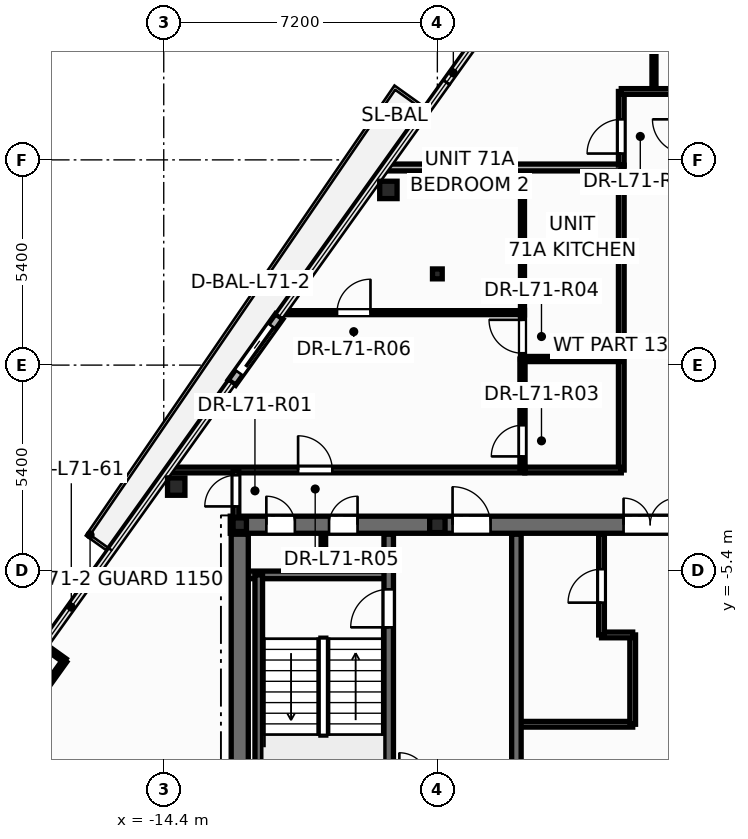
"""IFC4 building model, lengths in metres.
Left out: names, types, materials, properties, quantities, classifications, styles, units other than length and angle.
Written with IfcOpenShell. Run it as: python <this file> out.ifc"""

import sys

from ifc_helpers import new_model, si_unit, direction, frame, frame_2d, origin, origin_2d, place, context, subcontext, project, spatial, rectangle, hollow_circle, i_section, extrude, element, fill, save


model = new_model("IFC4")
c1 = context("Model", 3, precision=1e-05, world=origin(), true_north=direction((0.0, 1.0)))
c2 = subcontext(c1, "Body", "Model", "MODEL_VIEW")
j1 = project(units=[si_unit("LENGTHUNIT", "METRE"), si_unit("PLANEANGLEUNIT", "RADIAN")], contexts=[c1])
p1 = place(None, origin())
s1 = spatial("IfcSite", under=j1, at=p1, CompositionType="ELEMENT")
p2 = place(p1, origin())
s2 = spatial("IfcBuilding", under=s1, at=p2, CompositionType="ELEMENT")
p3 = place(p2, frame((0.0, 0.0, 270.6)))
s3 = spatial("IfcBuildingStorey", under=s2, at=p3, CompositionType="ELEMENT", Elevation=270.6)
for number, where, z_axis, x_axis in (
    (1, (-8.489, 4.61, 0.0), (0.0, 0.0, 1.0), (1.0, 0.0, 0.0)),
    (2, (-14.072, -3.196, 0.0), (0.0, 0.0, 1.0), (1.0, 0.0, 0.0)),
):
    element("IfcColumn", number, at=place(p3, frame(where, z_axis=z_axis, x_axis=x_axis)), inside=s3, PredefinedType="COLUMN", context=c2, shape_type="SweptSolid", body=[
        extrude(hollow_circle(Radius=0.229, WallThickness=0.016, at=origin_2d()), origin(), (0.0, 0.0, 1.0), 3.6),
    ])
p4 = place(p3, frame((-12.4, -4.2, 0.0), z_axis=(0.0, 0.0, 1.0), x_axis=(1.0, 0.0, 0.0)))
e3 = element("IfcColumn", 3, at=p4, inside=s3, PredefinedType="COLUMN", context=c2, shape_type="SweptSolid", body=[
    extrude(i_section(OverallWidth=0.352, OverallDepth=0.359, WebThickness=0.018, FlangeThickness=0.026, at=origin_2d()), origin(), (0.0, 0.0, 1.0), 3.6),
])
p5 = place(p3, frame((-7.2, -4.2, 0.0), z_axis=(0.0, 0.0, 1.0), x_axis=(1.0, 0.0, 0.0)))
e4 = element("IfcColumn", 4, at=p5, inside=s3, PredefinedType="PILASTER", context=c2, shape_type="SweptSolid", body=[
    extrude(i_section(OverallWidth=0.405, OverallDepth=0.414, WebThickness=0.022, FlangeThickness=0.032, at=origin_2d()), origin(), (0.0, 0.0, 1.0), 3.6),
])
p6 = place(p3, frame((-7.2, 2.4, 0.0), z_axis=(0.0, 0.0, 1.0), x_axis=(1.0, 0.0, 0.0)))
e5 = element("IfcColumn", 5, at=p6, inside=s3, PredefinedType="COLUMN", context=c2, shape_type="SweptSolid", body=[
    extrude(i_section(OverallWidth=0.256, OverallDepth=0.26, WebThickness=0.01, FlangeThickness=0.017, at=origin_2d()), origin(), (0.0, 0.0, 1.0), 3.6),
])
p7 = place(p3, frame((-11.361, 1.281, -0.015), z_axis=(0.0, 0.0, 1.0), x_axis=(-0.581702133873, -0.813401885569, 0.0)))
e6 = element("IfcWall", 6, at=p7, inside=s3, PredefinedType="STANDARD", context=c2, shape_type="SweptSolid", body=[
    extrude(rectangle(XDim=2.14, YDim=0.24, at=frame_2d((1.07, 0.0))), origin(), (0.0, 0.0, 1.0), 2.878),
])
p8 = place(p7, frame((0.32, 0.0, 0.015)))
e7 = element("IfcOpeningElement", 7, at=p8, cuts=e6, PredefinedType="OPENING", context=c2, shape_type="SweptSolid", body=[
    extrude(rectangle(XDim=1.506, YDim=2.204, at=frame_2d((0.75, 1.102))), frame((0.0, 0.13, 0.0), z_axis=(0.0, -1.0, 0.0), x_axis=(1.0, 0.0, 0.0)), (0.0, 0.0, 1.0), 0.26),
])
p9 = place(p3, frame((-5.12, -9.45, 0.0), z_axis=(0.0, 0.0, 1.0), x_axis=(1.0, 0.0, 0.0)))
e8 = element("IfcWall", 8, at=p9, inside=s3, PredefinedType="PARTITIONING", context=c2, shape_type="SweptSolid", body=[
    extrude(rectangle(XDim=3.06, YDim=0.15, at=frame_2d((1.53, 0.0))), origin(), (0.0, 0.0, 1.0), 3.345),
])
p10 = place(p3, frame((-2.06, -9.45, 0.0), z_axis=(0.0, 0.0, 1.0), x_axis=(0.0, 1.0, 0.0)))
e9 = element("IfcWall", 9, at=p10, inside=s3, PredefinedType="PARTITIONING", context=c2, shape_type="SweptSolid", body=[
    extrude(rectangle(XDim=2.35, YDim=0.15, at=frame_2d((1.175, 0.0))), origin(), (0.0, 0.0, 1.0), 3.345),
])
p11 = place(p3, frame((-2.88, -7.1, 0.0), z_axis=(0.0, 0.0, 1.0), x_axis=(1.0, 0.0, 0.0)))
e10 = element("IfcWall", 10, at=p11, inside=s3, PredefinedType="PARTITIONING", context=c2, shape_type="SweptSolid", body=[
    extrude(rectangle(XDim=0.82, YDim=0.15, at=frame_2d((0.41, 0.0))), origin(), (0.0, 0.0, 1.0), 3.345),
])
p12 = place(p3, frame((-2.88, -7.1, 0.0), z_axis=(0.0, 0.0, 1.0), x_axis=(0.0, 1.0, 0.0)))
e11 = element("IfcWall", 11, at=p12, inside=s3, PredefinedType="PARTITIONING", context=c2, shape_type="SweptSolid", body=[
    extrude(rectangle(XDim=2.65, YDim=0.15, at=frame_2d((1.325, 0.0))), origin(), (0.0, 0.0, 1.0), 3.345),
])
p13 = place(p12, frame((0.85, 0.0, 0.0)))
e12 = element("IfcOpeningElement", 12, at=p13, cuts=e11, PredefinedType="OPENING", context=c2, shape_type="SweptSolid", body=[
    extrude(rectangle(XDim=0.886, YDim=2.104, at=frame_2d((0.44, 1.052))), frame((0.0, 0.085, 0.0), z_axis=(0.0, -1.0, 0.0), x_axis=(1.0, 0.0, 0.0)), (0.0, 0.0, 1.0), 0.17),
])
p14 = place(p3, frame((-10.2, -5.52, 0.0), z_axis=(0.0, 0.0, 1.0), x_axis=(0.0, 1.0, 0.0)))
e13 = element("IfcWall", 13, at=p14, inside=s3, PredefinedType="PARTITIONING", context=c2, shape_type="SweptSolid", body=[
    extrude(rectangle(XDim=1.12, YDim=0.12, at=frame_2d((0.56, 0.0))), origin(), (0.0, 0.0, 1.0), 3.345),
])
p15 = place(p3, frame((-12.65, -4.2, 0.0), z_axis=(0.0, 0.0, 1.0), x_axis=(1.0, 0.0, 0.0)))
e14 = element("IfcWall", 14, at=p15, inside=s3, PredefinedType="SHEAR", context=c2, shape_type="SweptSolid", body=[
    extrude(rectangle(XDim=25.3, YDim=0.45, at=frame_2d((12.65, 0.0))), origin(), (0.0, 0.0, 1.0), 3.6),
])
p16 = place(p15, frame((0.95, 0.0, 0.0)))
e15 = element("IfcOpeningElement", 15, at=p16, cuts=e14, PredefinedType="OPENING", context=c2, shape_type="SweptSolid", body=[
    extrude(rectangle(XDim=0.756, YDim=2.054, at=frame_2d((0.375, 1.027))), frame((0.0, 0.235, 0.0), z_axis=(0.0, -1.0, 0.0), x_axis=(1.0, 0.0, 0.0)), (0.0, 0.0, 1.0), 0.47),
])
p17 = place(p15, frame((2.6, 0.0, 0.0)))
e16 = element("IfcOpeningElement", 16, at=p17, cuts=e14, PredefinedType="OPENING", context=c2, shape_type="SweptSolid", body=[
    extrude(rectangle(XDim=0.756, YDim=2.054, at=frame_2d((0.375, 1.027))), frame((0.0, 0.235, 0.0), z_axis=(0.0, -1.0, 0.0), x_axis=(1.0, 0.0, 0.0)), (0.0, 0.0, 1.0), 0.47),
])
p18 = place(p15, frame((21.85, 0.0, 0.0)))
e17 = element("IfcOpeningElement", 17, at=p18, cuts=e14, PredefinedType="OPENING", context=c2, shape_type="SweptSolid", body=[
    extrude(rectangle(XDim=0.756, YDim=2.054, at=frame_2d((0.375, 1.027))), frame((0.0, 0.235, 0.0), z_axis=(0.0, -1.0, 0.0), x_axis=(1.0, 0.0, 0.0)), (0.0, 0.0, 1.0), 0.47),
])
p19 = place(p15, frame((23.5, 0.0, 0.0)))
e18 = element("IfcOpeningElement", 18, at=p19, cuts=e14, PredefinedType="OPENING", context=c2, shape_type="SweptSolid", body=[
    extrude(rectangle(XDim=0.756, YDim=2.054, at=frame_2d((0.375, 1.027))), frame((0.0, 0.235, 0.0), z_axis=(0.0, -1.0, 0.0), x_axis=(1.0, 0.0, 0.0)), (0.0, 0.0, 1.0), 0.47),
])
p20 = place(p15, frame((5.85, 0.0, 0.0)))
e19 = element("IfcOpeningElement", 19, at=p20, cuts=e14, PredefinedType="OPENING", context=c2, shape_type="SweptSolid", body=[
    extrude(rectangle(XDim=1.006, YDim=2.104, at=frame_2d((0.5, 1.052))), frame((0.0, 0.235, 0.0), z_axis=(0.0, -1.0, 0.0), x_axis=(1.0, 0.0, 0.0)), (0.0, 0.0, 1.0), 0.47),
])
p21 = place(p15, frame((10.35, 0.0, 0.0)))
e20 = element("IfcOpeningElement", 20, at=p21, cuts=e14, PredefinedType="OPENING", context=c2, shape_type="SweptSolid", body=[
    extrude(rectangle(XDim=1.406, YDim=2.154, at=frame_2d((0.7, 1.077))), frame((0.0, 0.235, 0.0), z_axis=(0.0, -1.0, 0.0), x_axis=(1.0, 0.0, 0.0)), (0.0, 0.0, 1.0), 0.47),
])
p22 = place(p15, frame((18.45, 0.0, 0.0)))
e21 = element("IfcOpeningElement", 21, at=p22, cuts=e14, PredefinedType="OPENING", context=c2, shape_type="SweptSolid", body=[
    extrude(rectangle(XDim=1.006, YDim=2.104, at=frame_2d((0.5, 1.052))), frame((0.0, 0.235, 0.0), z_axis=(0.0, -1.0, 0.0), x_axis=(1.0, 0.0, 0.0)), (0.0, 0.0, 1.0), 0.47),
])
p23 = place(p3, frame((-12.35, -5.52, 0.0), z_axis=(0.0, 0.0, 1.0), x_axis=(1.0, 0.0, 0.0)))
e22 = element("IfcWall", 22, at=p23, inside=s3, PredefinedType="SOLIDWALL", context=c2, shape_type="SweptSolid", body=[
    extrude(rectangle(XDim=3.87, YDim=0.2, at=frame_2d((1.935, 0.0))), origin(), (0.0, 0.0, 1.0), 3.6),
])
p24 = place(p3, frame((-11.9, -13.1, 0.0), z_axis=(0.0, 0.0, 1.0), x_axis=(0.0, 1.0, 0.0)))
e23 = element("IfcWall", 23, at=p24, inside=s3, PredefinedType="SOLIDWALL", context=c2, shape_type="SweptSolid", body=[
    extrude(rectangle(XDim=7.58, YDim=0.2, at=frame_2d((3.79, 0.0))), origin(), (0.0, 0.0, 1.0), 3.6),
])
p25 = place(p3, frame((-8.48, -13.85, 0.0), z_axis=(0.0, 0.0, 1.0), x_axis=(0.0, 1.0, 0.0)))
e24 = element("IfcWall", 24, at=p25, inside=s3, PredefinedType="SHEAR", context=c2, shape_type="SweptSolid", body=[
    extrude(rectangle(XDim=9.4, YDim=0.25, at=frame_2d((4.7, 0.0))), origin(), (0.0, 0.0, 1.0), 3.6),
])
p26 = place(p25, frame((6.95, 0.0, 0.0)))
e25 = element("IfcOpeningElement", 25, at=p26, cuts=e24, PredefinedType="OPENING", context=c2, shape_type="SweptSolid", body=[
    extrude(rectangle(XDim=1.006, YDim=2.104, at=frame_2d((0.5, 1.052))), frame((0.0, 0.135, 0.0), z_axis=(0.0, -1.0, 0.0), x_axis=(1.0, 0.0, 0.0)), (0.0, 0.0, 1.0), 0.27),
])
p27 = place(p3, frame((-5.12, -13.85, 0.0), z_axis=(0.0, 0.0, 1.0), x_axis=(0.0, 1.0, 0.0)))
e26 = element("IfcWall", 26, at=p27, inside=s3, PredefinedType="SHEAR", context=c2, shape_type="SweptSolid", body=[
    extrude(rectangle(XDim=9.4, YDim=0.25, at=frame_2d((4.7, 0.0))), origin(), (0.0, 0.0, 1.0), 3.6),
])
p28 = place(p3, frame((-12.4, -13.85, 0.0), z_axis=(0.0, 0.0, 1.0), x_axis=(0.0, 1.0, 0.0)))
e27 = element("IfcWall", 27, at=p28, inside=s3, PredefinedType="SHEAR", context=c2, shape_type="SweptSolid", body=[
    extrude(rectangle(XDim=9.4, YDim=0.45, at=frame_2d((4.7, 0.0))), origin(), (0.0, 0.0, 1.0), 3.6),
])
p29 = place(p3, frame((-14.251, -2.76, 0.0), z_axis=(0.0, 0.0, 1.0), x_axis=(1.0, 0.0, 0.0)))
e28 = element("IfcWall", 28, at=p29, inside=s3, PredefinedType="PARTITIONING", context=c2, shape_type="SweptSolid", body=[
    extrude(rectangle(XDim=9.351, YDim=0.15, at=frame_2d((4.676, 0.0))), origin(), (0.0, 0.0, 1.0), 2.32),
])
p30 = place(p29, frame((3.386, 0.0, 0.0)))
e29 = element("IfcOpeningElement", 29, at=p30, cuts=e28, PredefinedType="OPENING", context=c2, shape_type="SweptSolid", body=[
    extrude(rectangle(XDim=0.906, YDim=2.104, at=frame_2d((0.45, 1.052))), frame((0.0, 0.085, 0.0), z_axis=(0.0, -1.0, 0.0), x_axis=(1.0, 0.0, 0.0)), (0.0, 0.0, 1.0), 0.17),
])
p31 = place(p3, frame((-1.5, 7.2, 0.0), z_axis=(0.0, 0.0, 1.0), x_axis=(0.0, 1.0, 0.0)))
e30 = element("IfcWall", 30, at=p31, inside=s3, PredefinedType="PARTITIONING", context=c2, shape_type="SweptSolid", body=[
    extrude(rectangle(XDim=6.917, YDim=0.105, at=frame_2d((3.458, 0.0))), origin(), (0.0, 0.0, 1.0), 2.718),
])
p32 = place(p3, frame((-11.29, 1.38, 0.0), z_axis=(0.0, 0.0, 1.0), x_axis=(1.0, 0.0, 0.0)))
e31 = element("IfcWall", 31, at=p32, inside=s3, PredefinedType="PARTITIONING", context=c2, shape_type="SweptSolid", body=[
    extrude(rectangle(XDim=6.33, YDim=0.105, at=frame_2d((3.165, 0.0))), origin(), (0.0, 0.0, 1.0), 2.32),
])
p33 = place(p32, frame((1.45, 0.0, 0.0)))
e32 = element("IfcOpeningElement", 32, at=p33, cuts=e31, PredefinedType="OPENING", context=c2, shape_type="SweptSolid", body=[
    extrude(rectangle(XDim=0.886, YDim=2.104, at=frame_2d((0.44, 1.052))), frame((0.0, 0.062, 0.0), z_axis=(0.0, -1.0, 0.0), x_axis=(1.0, 0.0, 0.0)), (0.0, 0.0, 1.0), 0.125),
])
p34 = place(p3, frame((-2.36, -2.76, 0.0), z_axis=(0.0, 0.0, 1.0), x_axis=(0.0, 1.0, 0.0)))
e33 = element("IfcWall", 33, at=p34, inside=s3, PredefinedType="PARTITIONING", context=c2, shape_type="SweptSolid", body=[
    extrude(rectangle(XDim=8.02, YDim=0.15, at=frame_2d((4.01, 0.0))), origin(), (0.0, 0.0, 1.0), 2.32),
])
p35 = place(p3, frame((-4.96, 1.32, 0.0), z_axis=(0.0, 0.0, 1.0), x_axis=(0.0, 1.0, 0.0)))
e34 = element("IfcWall", 34, at=p35, inside=s3, PredefinedType="PARTITIONING", context=c2, shape_type="SweptSolid", body=[
    extrude(rectangle(XDim=3.88, YDim=0.105, at=frame_2d((1.94, 0.0))), origin(), (0.0, 0.0, 1.0), 2.32),
])
p36 = place(p3, frame((-8.558, 5.2, 0.0), z_axis=(0.0, 0.0, 1.0), x_axis=(1.0, 0.0, 0.0)))
e35 = element("IfcWall", 35, at=p36, inside=s3, PredefinedType="PARTITIONING", context=c2, shape_type="SweptSolid", body=[
    extrude(rectangle(XDim=6.198, YDim=0.18, at=frame_2d((3.099, 0.0))), origin(), (0.0, 0.0, 1.0), 2.718),
])
p37 = place(p3, frame((-4.96, -2.76, 0.0), z_axis=(0.0, 0.0, 1.0), x_axis=(0.0, 1.0, 0.0)))
e36 = element("IfcWall", 36, at=p37, inside=s3, PredefinedType="PARTITIONING", context=c2, shape_type="SweptSolid", body=[
    extrude(rectangle(XDim=2.92, YDim=0.135, at=frame_2d((1.46, 0.0))), origin(), (0.0, 0.0, 1.0), 3.345),
])
p38 = place(p37, frame((0.357, 0.0, 0.0)))
e37 = element("IfcOpeningElement", 37, at=p38, cuts=e36, PredefinedType="OPENING", context=c2, shape_type="SweptSolid", body=[
    extrude(rectangle(XDim=0.826, YDim=2.104, at=frame_2d((0.41, 1.052))), frame((0.0, 0.078, 0.0), z_axis=(0.0, -1.0, 0.0), x_axis=(1.0, 0.0, 0.0)), (0.0, 0.0, 1.0), 0.155),
])
p39 = place(p3, frame((-4.898, -2.76, 0.0), z_axis=(0.0, 0.0, 1.0), x_axis=(1.0, 0.0, 0.0)))
e38 = element("IfcWall", 38, at=p39, inside=s3, PredefinedType="PARTITIONING", context=c2, shape_type="SweptSolid", body=[
    extrude(rectangle(XDim=2.538, YDim=0.15, at=frame_2d((1.269, 0.0))), origin(), (0.0, 0.0, 1.0), 2.964),
])
p40 = place(p3, frame((-4.96, 0.16, 0.0), z_axis=(0.0, 0.0, 1.0), x_axis=(1.0, 0.0, 0.0)))
e39 = element("IfcWall", 39, at=p40, inside=s3, PredefinedType="PARTITIONING", context=c2, shape_type="SweptSolid", body=[
    extrude(rectangle(XDim=2.6, YDim=0.135, at=frame_2d((1.3, 0.0))), origin(), (0.0, 0.0, 1.0), 2.964),
])
p41 = place(p3, frame((-17.003, -7.776, 0.0), z_axis=(0.0, 0.0, 1.0), x_axis=(-0.581731659236, -0.813380769777, 0.0)))
e40 = element("IfcWall", 40, at=p41, inside=s3, PredefinedType="PARTITIONING", context=c2, shape_type="SweptSolid", body=[
    extrude(rectangle(XDim=2.48, YDim=0.12, at=frame_2d((1.24, 0.0))), origin(), (0.0, 0.0, 1.0), 2.32),
])
p42 = place(p3, frame((-2.36, 5.262, 0.0), z_axis=(0.0, 0.0, 1.0), x_axis=(0.0, 1.0, 0.0)))
e41 = element("IfcWall", 41, at=p42, inside=s3, PredefinedType="PARTITIONING", context=c2, shape_type="SweptSolid", body=[
    extrude(rectangle(XDim=1.938, YDim=0.15, at=frame_2d((0.969, 0.0))), origin(), (0.0, 0.0, 1.0), 2.964),
])
p43 = place(p42, frame((0.305, 0.0, 0.0)))
e42 = element("IfcOpeningElement", 42, at=p43, cuts=e41, PredefinedType="OPENING", context=c2, shape_type="SweptSolid", body=[
    extrude(rectangle(XDim=0.906, YDim=2.104, at=frame_2d((0.45, 1.052))), frame((0.0, 0.085, 0.0), z_axis=(0.0, -1.0, 0.0), x_axis=(1.0, 0.0, 0.0)), (0.0, 0.0, 1.0), 0.17),
])
p44 = place(p3, frame((-12.5, -4.24, 0.0), z_axis=(0.0, 0.0, 1.0), x_axis=(0.0, 1.0, 0.0)))
e43 = element("IfcWall", 43, at=p44, inside=s3, PredefinedType="PARTITIONING", context=c2, shape_type="SweptSolid", body=[
    extrude(rectangle(XDim=1.48, YDim=0.15, at=frame_2d((0.74, 0.0))), origin(), (0.0, 0.0, 1.0), 2.32),
])
p45 = place(p44, frame((0.522, 0.0, 0.0)))
e44 = element("IfcOpeningElement", 44, at=p45, cuts=e43, PredefinedType="OPENING", context=c2, shape_type="SweptSolid", body=[
    extrude(rectangle(XDim=0.826, YDim=2.104, at=frame_2d((0.41, 1.052))), frame((0.0, 0.085, 0.0), z_axis=(0.0, -1.0, 0.0), x_axis=(1.0, 0.0, 0.0)), (0.0, 0.0, 1.0), 0.17),
])
p46 = place(p3, frame((-4.96, 0.16, 0.0), z_axis=(0.0, 0.0, 1.0), x_axis=(0.0, 1.0, 0.0)))
e45 = element("IfcWall", 45, at=p46, inside=s3, PredefinedType="PARTITIONING", context=c2, shape_type="SweptSolid", body=[
    extrude(rectangle(XDim=1.28, YDim=0.105, at=frame_2d((0.64, 0.0))), origin(), (0.0, 0.0, 1.0), 3.345),
])
p47 = place(p46, frame((0.152, 0.0, 0.0)))
e46 = element("IfcOpeningElement", 46, at=p47, cuts=e45, PredefinedType="OPENING", context=c2, shape_type="SweptSolid", body=[
    extrude(rectangle(XDim=0.886, YDim=2.104, at=frame_2d((0.44, 1.052))), frame((0.0, 0.062, 0.0), z_axis=(0.0, -1.0, 0.0), x_axis=(1.0, 0.0, 0.0)), (0.0, 0.0, 1.0), 0.125),
])
p48 = place(p3, frame((-2.36, 7.2, 0.0), z_axis=(0.0, 0.0, 1.0), x_axis=(1.0, 0.0, 0.0)))
e47 = element("IfcWall", 47, at=p48, inside=s3, PredefinedType="PARTITIONING", context=c2, shape_type="SweptSolid", body=[
    extrude(rectangle(XDim=1.72, YDim=0.15, at=frame_2d((0.86, 0.0))), origin(), (0.0, 0.0, 1.0), 2.964),
])
p49 = place(p3, frame((-17.548, -7.386, 0.0), z_axis=(0.0, 0.0, 1.0), x_axis=(0.813265440227, -0.581892879947, 0.0)))
e48 = element("IfcWall", 48, at=p49, inside=s3, PredefinedType="PARTITIONING", context=c2, shape_type="SweptSolid", body=[
    extrude(rectangle(XDim=0.67, YDim=0.12, at=frame_2d((0.335, 0.0))), origin(), (0.0, 0.0, 1.0), 2.863),
])
p50 = place(p8, origin())
e49 = element("IfcDoor", 49, at=p50, inside=s3, OperationType="SLIDING_TO_RIGHT", PredefinedType="DOOR", context=c2, shape_type="SweptSolid", body=[
    extrude(rectangle(XDim=1.5, YDim=2.2, at=frame_2d((0.75, 1.1))), frame((0.0, 0.025, 0.0), z_axis=(0.0, -1.0, 0.0), x_axis=(1.0, 0.0, 0.0)), (0.0, 0.0, 1.0), 0.05),
])
fill(e7, e49)
p51 = place(p13, origin())
e50 = element("IfcDoor", 50, at=p51, inside=s3, OperationType="SINGLE_SWING_LEFT", PredefinedType="DOOR", context=c2, shape_type="SweptSolid", body=[
    extrude(rectangle(XDim=0.88, YDim=2.1, at=frame_2d((0.44, 1.05))), frame((0.0, 0.025, 0.0), z_axis=(0.0, -1.0, 0.0), x_axis=(1.0, 0.0, 0.0)), (0.0, 0.0, 1.0), 0.05),
])
fill(e12, e50)
p52 = place(p26, origin())
e51 = element("IfcDoor", 51, at=p52, inside=s3, OperationType="SINGLE_SWING_LEFT", PredefinedType="DOOR", context=c2, shape_type="SweptSolid", body=[
    extrude(rectangle(XDim=1.0, YDim=2.1, at=frame_2d((0.5, 1.05))), frame((0.0, 0.025, 0.0), z_axis=(0.0, -1.0, 0.0), x_axis=(1.0, 0.0, 0.0)), (0.0, 0.0, 1.0), 0.05),
])
fill(e25, e51)
p53 = place(p16, origin())
e52 = element("IfcDoor", 52, at=p53, inside=s3, OperationType="SINGLE_SWING_LEFT", PredefinedType="DOOR", context=c2, shape_type="SweptSolid", body=[
    extrude(rectangle(XDim=0.75, YDim=2.05, at=frame_2d((0.375, 1.025))), frame((0.0, 0.025, 0.0), z_axis=(0.0, -1.0, 0.0), x_axis=(1.0, 0.0, 0.0)), (0.0, 0.0, 1.0), 0.05),
])
fill(e15, e52)
p54 = place(p17, origin())
e53 = element("IfcDoor", 53, at=p54, inside=s3, OperationType="SINGLE_SWING_RIGHT", PredefinedType="DOOR", context=c2, shape_type="SweptSolid", body=[
    extrude(rectangle(XDim=0.75, YDim=2.05, at=frame_2d((0.375, 1.025))), frame((0.0, 0.025, 0.0), z_axis=(0.0, -1.0, 0.0), x_axis=(1.0, 0.0, 0.0)), (0.0, 0.0, 1.0), 0.05),
])
fill(e16, e53)
p55 = place(p20, origin())
e54 = element("IfcDoor", 54, at=p55, inside=s3, OperationType="SINGLE_SWING_LEFT", PredefinedType="DOOR", context=c2, shape_type="SweptSolid", body=[
    extrude(rectangle(XDim=1.0, YDim=2.1, at=frame_2d((0.5, 1.05))), frame((0.0, 0.025, 0.0), z_axis=(0.0, -1.0, 0.0), x_axis=(1.0, 0.0, 0.0)), (0.0, 0.0, 1.0), 0.05),
])
fill(e19, e54)
p56 = place(p21, origin())
e55 = element("IfcDoor", 55, at=p56, inside=s3, OperationType="DOUBLE_DOOR_SINGLE_SWING", PredefinedType="DOOR", context=c2, shape_type="SweptSolid", body=[
    extrude(rectangle(XDim=1.4, YDim=2.15, at=frame_2d((0.7, 1.075))), frame((0.0, 0.025, 0.0), z_axis=(0.0, -1.0, 0.0), x_axis=(1.0, 0.0, 0.0)), (0.0, 0.0, 1.0), 0.05),
])
fill(e20, e55)
p57 = place(p45, origin())
e56 = element("IfcDoor", 56, at=p57, inside=s3, OperationType="SINGLE_SWING_LEFT", PredefinedType="DOOR", context=c2, shape_type="SweptSolid", body=[
    extrude(rectangle(XDim=0.82, YDim=2.1, at=frame_2d((0.41, 1.05))), frame((0.0, 0.025, 0.0), z_axis=(0.0, -1.0, 0.0), x_axis=(1.0, 0.0, 0.0)), (0.0, 0.0, 1.0), 0.05),
])
fill(e44, e56)
p58 = place(p38, origin())
e57 = element("IfcDoor", 57, at=p58, inside=s3, OperationType="SINGLE_SWING_LEFT", PredefinedType="DOOR", context=c2, shape_type="SweptSolid", body=[
    extrude(rectangle(XDim=0.82, YDim=2.1, at=frame_2d((0.41, 1.05))), frame((0.0, 0.025, 0.0), z_axis=(0.0, -1.0, 0.0), x_axis=(1.0, 0.0, 0.0)), (0.0, 0.0, 1.0), 0.05),
])
fill(e37, e57)
p59 = place(p47, origin())
e58 = element("IfcDoor", 58, at=p59, inside=s3, OperationType="SINGLE_SWING_RIGHT", PredefinedType="DOOR", context=c2, shape_type="SweptSolid", body=[
    extrude(rectangle(XDim=0.88, YDim=2.1, at=frame_2d((0.44, 1.05))), frame((0.0, 0.025, 0.0), z_axis=(0.0, -1.0, 0.0), x_axis=(1.0, 0.0, 0.0)), (0.0, 0.0, 1.0), 0.05),
])
fill(e46, e58)
p60 = place(p30, origin())
e59 = element("IfcDoor", 59, at=p60, inside=s3, OperationType="SINGLE_SWING_LEFT", PredefinedType="DOOR", context=c2, shape_type="SweptSolid", body=[
    extrude(rectangle(XDim=0.9, YDim=2.1, at=frame_2d((0.45, 1.05))), frame((0.0, 0.025, 0.0), z_axis=(0.0, -1.0, 0.0), x_axis=(1.0, 0.0, 0.0)), (0.0, 0.0, 1.0), 0.05),
])
fill(e29, e59)
p61 = place(p33, origin())
e60 = element("IfcDoor", 60, at=p61, inside=s3, OperationType="SINGLE_SWING_RIGHT", PredefinedType="DOOR", context=c2, shape_type="SweptSolid", body=[
    extrude(rectangle(XDim=0.88, YDim=2.1, at=frame_2d((0.44, 1.05))), frame((0.0, 0.025, 0.0), z_axis=(0.0, -1.0, 0.0), x_axis=(1.0, 0.0, 0.0)), (0.0, 0.0, 1.0), 0.05),
])
fill(e32, e60)
p62 = place(p43, origin())
e61 = element("IfcDoor", 61, at=p62, inside=s3, OperationType="SINGLE_SWING_LEFT", PredefinedType="DOOR", context=c2, shape_type="SweptSolid", body=[
    extrude(rectangle(XDim=0.9, YDim=2.1, at=frame_2d((0.45, 1.05))), frame((0.0, 0.025, 0.0), z_axis=(0.0, -1.0, 0.0), x_axis=(1.0, 0.0, 0.0)), (0.0, 0.0, 1.0), 0.05),
])
fill(e42, e61)
save(model, sys.argv[1])
